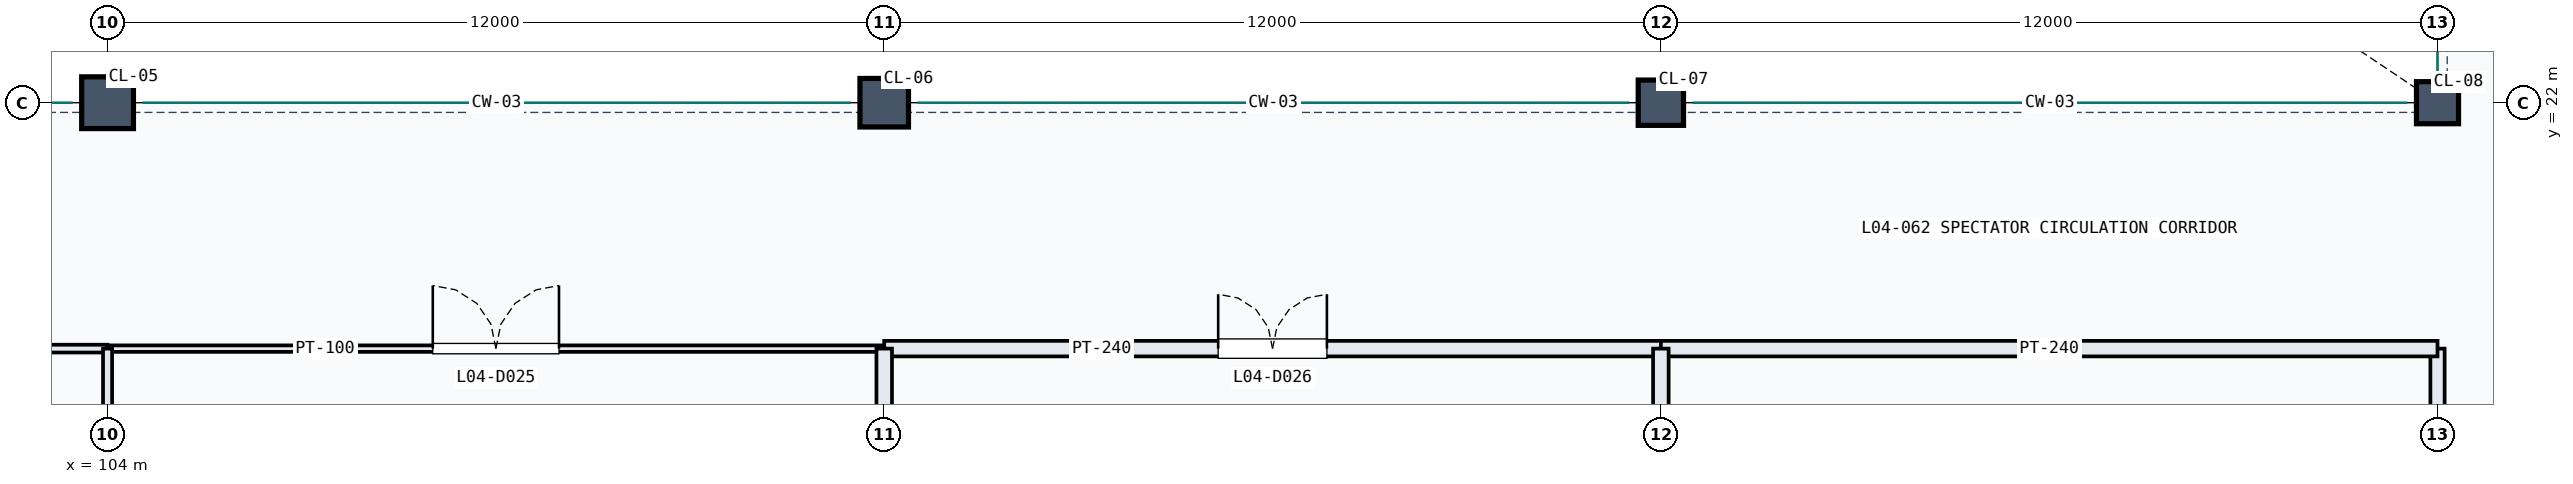
"""IFC4 building model, lengths in metres.
Left out: names, types, materials, properties, quantities, classifications, styles, units other than length and angle.
Written with IfcOpenShell. Run it as: python <this file> out.ifc"""

import sys

from ifc_helpers import new_model, si_unit, direction, frame, frame_2d, origin, origin_2d, place, context, subcontext, project, spatial, rectangle, extrude, element, fill, save


model = new_model("IFC4")
c1 = context("Model", 3, precision=1e-05, world=origin(), true_north=direction((0.0, 1.0)))
c2 = subcontext(c1, "Body", "Model", "MODEL_VIEW")
j1 = project(units=[si_unit("LENGTHUNIT", "METRE"), si_unit("PLANEANGLEUNIT", "RADIAN")], contexts=[c1])
p1 = place(None, origin())
s1 = spatial("IfcSite", under=j1, at=p1, CompositionType="ELEMENT")
p2 = place(p1, origin())
s2 = spatial("IfcBuilding", under=s1, at=p2, CompositionType="ELEMENT")
p3 = place(p2, frame((0.0, 0.0, 19.5)))
s3 = spatial("IfcBuildingStorey", under=s2, at=p3, CompositionType="ELEMENT", Elevation=19.5)
p4 = place(p3, frame((104.0, 22.0, 0.0), z_axis=(0.0, 0.0, 1.0), x_axis=(1.0, 0.0, 0.0)))
e1 = element("IfcColumn", 1, at=p4, inside=s3, PredefinedType="COLUMN", context=c2, shape_type="SweptSolid", body=[
    extrude(rectangle(XDim=0.8, YDim=0.8, at=origin_2d()), origin(), (0.0, 0.0, 1.0), 4.8),
])
p5 = place(p3, frame((116.0, 22.0, 0.0), z_axis=(0.0, 0.0, 1.0), x_axis=(1.0, 0.0, 0.0)))
e2 = element("IfcColumn", 2, at=p5, inside=s3, PredefinedType="COLUMN", context=c2, shape_type="SweptSolid", body=[
    extrude(rectangle(XDim=0.75, YDim=0.75, at=origin_2d()), origin(), (0.0, 0.0, 1.0), 4.8),
])
p6 = place(p3, frame((128.0, 22.0, 0.0), z_axis=(0.0, 0.0, 1.0), x_axis=(1.0, 0.0, 0.0)))
e3 = element("IfcColumn", 3, at=p6, inside=s3, PredefinedType="COLUMN", context=c2, shape_type="SweptSolid", body=[
    extrude(rectangle(XDim=0.7, YDim=0.7, at=origin_2d()), origin(), (0.0, 0.0, 1.0), 4.8),
])
p7 = place(p3, frame((140.0, 22.0, 0.0), z_axis=(0.0, 0.0, 1.0), x_axis=(1.0, 0.0, 0.0)))
e4 = element("IfcColumn", 4, at=p7, inside=s3, PredefinedType="COLUMN", context=c2, shape_type="SweptSolid", body=[
    extrude(rectangle(XDim=0.65, YDim=0.65, at=origin_2d()), origin(), (0.0, 0.0, 1.0), 4.8),
])
p8 = place(p3, frame((140.0, 11.22, 0.0), z_axis=(0.0, 0.0, 1.0), x_axis=(0.0, 1.0, 0.0)))
e5 = element("IfcWall", 5, at=p8, inside=s3, PredefinedType="PARTITIONING", context=c2, shape_type="SweptSolid", body=[
    extrude(rectangle(XDim=6.98, YDim=0.22, at=frame_2d((3.49, 0.0))), origin(), (0.0, 0.0, 1.0), 3.707),
])
p9 = place(p8, frame((2.98, 0.0, 0.0)))
e6 = element("IfcOpeningElement", 6, at=p9, cuts=e5, PredefinedType="OPENING", context=c2, shape_type="SweptSolid", body=[
    extrude(rectangle(XDim=1.02, YDim=2.25, at=frame_2d((0.51, 1.125))), frame((0.0, 0.12, 0.0), z_axis=(0.0, -1.0, 0.0), x_axis=(1.0, 0.0, 0.0)), (0.0, 0.0, 1.0), 0.24),
])
p10 = place(p3, frame((94.0, 18.2, 0.0), z_axis=(0.0, 0.0, 1.0), x_axis=(1.0, 0.0, 0.0)))
e7 = element("IfcWall", 7, at=p10, inside=s3, PredefinedType="PARTITIONING", context=c2, shape_type="SweptSolid", body=[
    extrude(rectangle(XDim=10.0, YDim=0.12, at=frame_2d((5.0, 0.0))), origin(), (0.0, 0.0, 1.0), 3.707),
])
p11 = place(p10, frame((4.48, 0.0, 0.0)))
e8 = element("IfcOpeningElement", 8, at=p11, cuts=e7, PredefinedType="OPENING", context=c2, shape_type="SweptSolid", body=[
    extrude(rectangle(XDim=1.04, YDim=2.2, at=frame_2d((0.52, 1.1))), frame((0.0, 0.07, 0.0), z_axis=(0.0, -1.0, 0.0), x_axis=(1.0, 0.0, 0.0)), (0.0, 0.0, 1.0), 0.14),
])
p12 = place(p3, frame((104.0, 18.2, 0.0), z_axis=(0.0, 0.0, 1.0), x_axis=(1.0, 0.0, 0.0)))
e9 = element("IfcWall", 9, at=p12, inside=s3, PredefinedType="PARTITIONING", context=c2, shape_type="SweptSolid", body=[
    extrude(rectangle(XDim=12.0, YDim=0.1, at=frame_2d((6.0, 0.0))), origin(), (0.0, 0.0, 1.0), 3.49),
])
p13 = place(p12, frame((5.025, 0.0, 0.0)))
e10 = element("IfcOpeningElement", 10, at=p13, cuts=e9, PredefinedType="OPENING", context=c2, shape_type="SweptSolid", body=[
    extrude(rectangle(XDim=1.95, YDim=2.4, at=frame_2d((0.975, 1.2))), frame((0.0, 0.06, 0.0), z_axis=(0.0, -1.0, 0.0), x_axis=(1.0, 0.0, 0.0)), (0.0, 0.0, 1.0), 0.12),
])
p14 = place(p3, frame((116.0, 18.2, 0.0), z_axis=(0.0, 0.0, 1.0), x_axis=(1.0, 0.0, 0.0)))
e11 = element("IfcWall", 11, at=p14, inside=s3, PredefinedType="PARTITIONING", context=c2, shape_type="SweptSolid", body=[
    extrude(rectangle(XDim=12.0, YDim=0.24, at=frame_2d((6.0, 0.0))), origin(), (0.0, 0.0, 1.0), 3.49),
])
p15 = place(p14, frame((5.16, 0.0, 0.0)))
e12 = element("IfcOpeningElement", 12, at=p15, cuts=e11, PredefinedType="OPENING", context=c2, shape_type="SweptSolid", body=[
    extrude(rectangle(XDim=1.68, YDim=2.2, at=frame_2d((0.84, 1.1))), frame((0.0, 0.13, 0.0), z_axis=(0.0, -1.0, 0.0), x_axis=(1.0, 0.0, 0.0)), (0.0, 0.0, 1.0), 0.26),
])
p16 = place(p3, frame((128.0, 18.2, 0.0), z_axis=(0.0, 0.0, 1.0), x_axis=(1.0, 0.0, 0.0)))
e13 = element("IfcWall", 13, at=p16, inside=s3, PredefinedType="PARTITIONING", context=c2, shape_type="SweptSolid", body=[
    extrude(rectangle(XDim=12.0, YDim=0.24, at=frame_2d((6.0, 0.0))), origin(), (0.0, 0.0, 1.0), 3.64),
])
p17 = place(p3, frame((104.0, 4.185, 0.0), z_axis=(0.0, 0.0, 1.0), x_axis=(0.0, 1.0, 0.0)))
e14 = element("IfcWall", 14, at=p17, inside=s3, PredefinedType="PARTITIONING", context=c2, shape_type="SweptSolid", body=[
    extrude(rectangle(XDim=14.015, YDim=0.14, at=frame_2d((7.008, 0.0))), origin(), (0.0, 0.0, 1.0), 3.79),
])
p18 = place(p3, frame((116.0, 3.016, 0.0), z_axis=(0.0, 0.0, 1.0), x_axis=(0.0, 1.0, 0.0)))
e15 = element("IfcWall", 15, at=p18, inside=s3, PredefinedType="PARTITIONING", context=c2, shape_type="SweptSolid", body=[
    extrude(rectangle(XDim=15.184, YDim=0.24, at=frame_2d((7.592, 0.0))), origin(), (0.0, 0.0, 1.0), 3.49),
])
p19 = place(p3, frame((128.0, 3.712, 0.0), z_axis=(0.0, 0.0, 1.0), x_axis=(0.0, 1.0, 0.0)))
e16 = element("IfcWall", 16, at=p19, inside=s3, PredefinedType="PARTITIONING", context=c2, shape_type="SweptSolid", body=[
    extrude(rectangle(XDim=14.488, YDim=0.24, at=frame_2d((7.244, 0.0))), origin(), (0.0, 0.0, 1.0), 3.64),
])
p20 = place(p13, origin())
e17 = element("IfcDoor", 17, at=p20, inside=s3, OperationType="DOUBLE_DOOR_SINGLE_SWING", PredefinedType="DOOR", context=c2, shape_type="SweptSolid", body=[
    extrude(rectangle(XDim=1.95, YDim=2.4, at=frame_2d((0.975, 1.2))), frame((0.0, 0.025, 0.0), z_axis=(0.0, -1.0, 0.0), x_axis=(1.0, 0.0, 0.0)), (0.0, 0.0, 1.0), 0.05),
])
fill(e10, e17)
p21 = place(p15, origin())
e18 = element("IfcDoor", 18, at=p21, inside=s3, OperationType="DOUBLE_DOOR_SINGLE_SWING", PredefinedType="DOOR", context=c2, shape_type="SweptSolid", body=[
    extrude(rectangle(XDim=1.68, YDim=2.2, at=frame_2d((0.84, 1.1))), frame((0.0, 0.025, 0.0), z_axis=(0.0, -1.0, 0.0), x_axis=(1.0, 0.0, 0.0)), (0.0, 0.0, 1.0), 0.05),
])
fill(e12, e18)
save(model, sys.argv[1])
